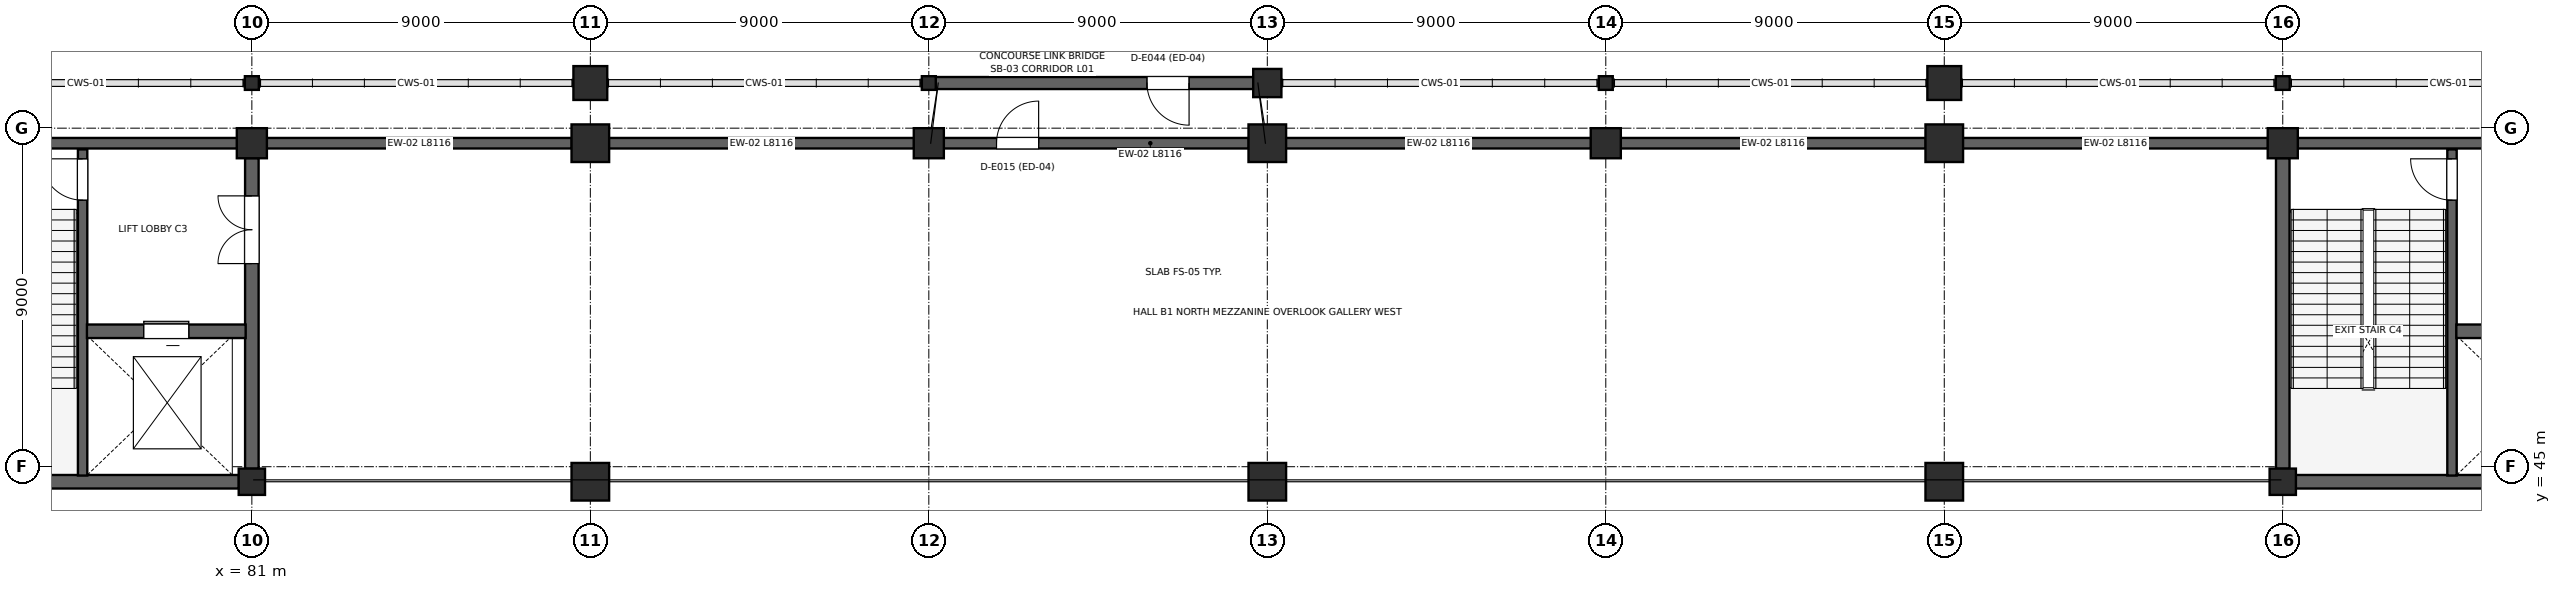
"""IFC4 building model, lengths in metres.
Left out: names, types, materials, properties, quantities, classifications, styles, units other than length and angle.
Written with IfcOpenShell. Run it as: python <this file> out.ifc"""

import sys

from ifc_helpers import new_model, si_unit, direction, frame, frame_2d, origin, origin_2d, place, context, subcontext, project, spatial, rectangle, circle, i_section, extrude, element, fill, save


model = new_model("IFC4")
c1 = context("Model", 3, precision=1e-05, world=origin(), true_north=direction((0.0, 1.0)))
c2 = subcontext(c1, "Body", "Model", "MODEL_VIEW")
j1 = project(units=[si_unit("LENGTHUNIT", "METRE"), si_unit("PLANEANGLEUNIT", "RADIAN")], contexts=[c1])
p1 = place(None, origin())
s1 = spatial("IfcSite", under=j1, at=p1, CompositionType="ELEMENT")
p2 = place(p1, origin())
s2 = spatial("IfcBuilding", under=s1, at=p2, CompositionType="ELEMENT")
p3 = place(p2, frame((0.0, 0.0, 6.0)))
s3 = spatial("IfcBuildingStorey", under=s2, at=p3, CompositionType="ELEMENT", Elevation=6.0)
for number, where, z_axis, x_axis in (
    (1, (90.0, 44.6, 0.0), (0.0, 0.0, 1.0), (1.0, 0.0, 0.0)),
    (2, (90.0, 53.6, 0.0), (0.0, 0.0, 1.0), (1.0, 0.0, 0.0)),
    (3, (108.0, 44.6, 0.0), (0.0, 0.0, 1.0), (1.0, 0.0, 0.0)),
    (4, (108.0, 53.6, 0.0), (0.0, 0.0, 1.0), (1.0, 0.0, 0.0)),
    (5, (126.0, 44.6, 0.0), (0.0, 0.0, 1.0), (1.0, 0.0, 0.0)),
    (6, (126.0, 53.6, 0.0), (0.0, 0.0, 1.0), (1.0, 0.0, 0.0)),
):
    element("IfcColumn", number, at=place(p3, frame(where, z_axis=z_axis, x_axis=x_axis)), inside=s3, PredefinedType="COLUMN", context=c2, shape_type="SweptSolid", body=[
        extrude(rectangle(XDim=1.0, YDim=1.0, at=origin_2d()), origin(), (0.0, 0.0, 1.0), 6.0),
    ])
for number, where, z_axis, x_axis in (
    (7, (81.0, 53.6, 0.0), (0.0, 0.0, 1.0), (1.0, 0.0, 0.0)),
    (8, (99.0, 53.6, 0.0), (0.0, 0.0, 1.0), (1.0, 0.0, 0.0)),
    (9, (117.0, 53.6, 0.0), (0.0, 0.0, 1.0), (1.0, 0.0, 0.0)),
    (10, (135.0, 53.6, 0.0), (0.0, 0.0, 1.0), (1.0, 0.0, 0.0)),
):
    element("IfcColumn", number, at=place(p3, frame(where, z_axis=z_axis, x_axis=x_axis)), inside=s3, PredefinedType="COLUMN", context=c2, shape_type="SweptSolid", body=[
        extrude(rectangle(XDim=0.8, YDim=0.8, at=origin_2d()), origin(), (0.0, 0.0, 1.0), 6.0),
    ])
for number, where, z_axis, x_axis in (
    (11, (81.0, 44.6, 0.0), (0.0, 0.0, 1.0), (1.0, 0.0, 0.0)),
    (12, (135.0, 44.6, 0.0), (0.0, 0.0, 1.0), (1.0, 0.0, 0.0)),
):
    element("IfcColumn", number, at=place(p3, frame(where, z_axis=z_axis, x_axis=x_axis)), inside=s3, PredefinedType="COLUMN", context=c2, shape_type="SweptSolid", body=[
        extrude(rectangle(XDim=0.7, YDim=0.7, at=origin_2d()), origin(), (0.0, 0.0, 1.0), 6.0),
    ])
p4 = place(p3, frame((81.0, 55.2, 0.0), z_axis=(0.0, 0.0, 1.0), x_axis=(1.0, 0.0, 0.0)))
e13 = element("IfcColumn", 13, at=p4, inside=s3, PredefinedType="COLUMN", context=c2, shape_type="SweptSolid", body=[
    extrude(i_section(OverallWidth=0.371, OverallDepth=0.364, WebThickness=0.013, FlangeThickness=0.022, at=origin_2d()), origin(), (0.0, 0.0, 1.0), 6.0),
])
p5 = place(p3, frame((90.0, 55.2, 0.0), z_axis=(0.0, 0.0, 1.0), x_axis=(1.0, 0.0, 0.0)))
e14 = element("IfcColumn", 14, at=p5, inside=s3, PredefinedType="COLUMN", context=c2, shape_type="SweptSolid", body=[
    extrude(circle(Radius=0.45, at=origin_2d()), origin(), (0.0, 0.0, 1.0), 6.0),
])
p6 = place(p3, frame((99.0, 55.2, 0.0), z_axis=(0.0, 0.0, 1.0), x_axis=(1.0, 0.0, 0.0)))
e15 = element("IfcColumn", 15, at=p6, inside=s3, PredefinedType="COLUMN", context=c2, shape_type="SweptSolid", body=[
    extrude(i_section(OverallWidth=0.371, OverallDepth=0.364, WebThickness=0.013, FlangeThickness=0.022, at=origin_2d()), origin(), (0.0, 0.0, 1.0), 6.0),
])
p7 = place(p3, frame((108.0, 55.2, 0.0), z_axis=(0.0, 0.0, 1.0), x_axis=(1.0, 0.0, 0.0)))
e16 = element("IfcColumn", 16, at=p7, inside=s3, PredefinedType="PILASTER", context=c2, shape_type="SweptSolid", body=[
    extrude(circle(Radius=0.375, at=origin_2d()), origin(), (0.0, 0.0, 1.0), 6.0),
])
p8 = place(p3, frame((117.0, 55.2, 0.0), z_axis=(0.0, 0.0, 1.0), x_axis=(1.0, 0.0, 0.0)))
e17 = element("IfcColumn", 17, at=p8, inside=s3, PredefinedType="COLUMN", context=c2, shape_type="SweptSolid", body=[
    extrude(i_section(OverallWidth=0.371, OverallDepth=0.364, WebThickness=0.013, FlangeThickness=0.022, at=origin_2d()), origin(), (0.0, 0.0, 1.0), 6.0),
])
p9 = place(p3, frame((126.0, 55.2, 0.0), z_axis=(0.0, 0.0, 1.0), x_axis=(1.0, 0.0, 0.0)))
e18 = element("IfcColumn", 18, at=p9, inside=s3, PredefinedType="COLUMN", context=c2, shape_type="SweptSolid", body=[
    extrude(circle(Radius=0.45, at=origin_2d()), origin(), (0.0, 0.0, 1.0), 6.0),
])
p10 = place(p3, frame((135.0, 55.2, 0.0), z_axis=(0.0, 0.0, 1.0), x_axis=(1.0, 0.0, 0.0)))
e19 = element("IfcColumn", 19, at=p10, inside=s3, PredefinedType="COLUMN", context=c2, shape_type="SweptSolid", body=[
    extrude(i_section(OverallWidth=0.371, OverallDepth=0.364, WebThickness=0.013, FlangeThickness=0.022, at=origin_2d()), origin(), (0.0, 0.0, 1.0), 6.0),
])
for number, where, z_axis, x_axis in (
    (20, (72.492, 53.6, 0.0), (0.0, 0.0, 1.0), (1.0, 0.0, 0.0)),
    (21, (81.392, 53.6, 0.0), (0.0, 0.0, 1.0), (1.0, 0.0, 0.0)),
    (22, (90.492, 53.6, 0.0), (0.0, 0.0, 1.0), (1.0, 0.0, 0.0)),
):
    element("IfcWall", number, at=place(p3, frame(where, z_axis=z_axis, x_axis=x_axis)), inside=s3, PredefinedType="STANDARD", context=c2, shape_type="SweptSolid", body=[
        extrude(rectangle(XDim=8.116, YDim=0.28, at=frame_2d((4.058, 0.0))), origin(), (0.0, 0.0, 1.0), 5.7),
    ])
p11 = place(p3, frame((99.392, 53.6, 0.0), z_axis=(0.0, 0.0, 1.0), x_axis=(1.0, 0.0, 0.0)))
e23 = element("IfcWall", 23, at=p11, inside=s3, PredefinedType="STANDARD", context=c2, shape_type="SweptSolid", body=[
    extrude(rectangle(XDim=8.116, YDim=0.28, at=frame_2d((4.058, 0.0))), origin(), (0.0, 0.0, 1.0), 5.7),
])
p12 = place(p11, frame((1.408, 0.0, 0.0)))
e24 = element("IfcOpeningElement", 24, at=p12, cuts=e23, PredefinedType="OPENING", context=c2, shape_type="SweptSolid", body=[
    extrude(rectangle(XDim=1.12, YDim=2.24, at=frame_2d((0.56, 1.12))), frame((0.0, 0.15, 0.0), z_axis=(0.0, -1.0, 0.0), x_axis=(1.0, 0.0, 0.0)), (0.0, 0.0, 1.0), 0.3),
])
for number, where, z_axis, x_axis in (
    (25, (108.492, 53.6, 0.0), (0.0, 0.0, 1.0), (1.0, 0.0, 0.0)),
    (26, (117.392, 53.6, 0.0), (0.0, 0.0, 1.0), (1.0, 0.0, 0.0)),
    (27, (126.492, 53.6, 0.0), (0.0, 0.0, 1.0), (1.0, 0.0, 0.0)),
    (28, (135.392, 53.6, 0.0), (0.0, 0.0, 1.0), (1.0, 0.0, 0.0)),
):
    element("IfcWall", number, at=place(p3, frame(where, z_axis=z_axis, x_axis=x_axis)), inside=s3, PredefinedType="STANDARD", context=c2, shape_type="SweptSolid", body=[
        extrude(rectangle(XDim=8.116, YDim=0.28, at=frame_2d((4.058, 0.0))), origin(), (0.0, 0.0, 1.0), 5.7),
    ])
p13 = place(p3, frame((107.64, 55.2, 0.0), z_axis=(0.0, 0.0, 1.0), x_axis=(-1.0, 0.0, 0.0)))
e29 = element("IfcWall", 29, at=p13, inside=s3, PredefinedType="STANDARD", context=c2, shape_type="SweptSolid", body=[
    extrude(rectangle(XDim=8.627, YDim=0.32, at=frame_2d((4.313, 0.0))), origin(), (0.0, 0.0, 1.0), 5.78),
])
p14 = place(p13, frame((1.72, 0.0, 0.0)))
e30 = element("IfcOpeningElement", 30, at=p14, cuts=e29, PredefinedType="OPENING", context=c2, shape_type="SweptSolid", body=[
    extrude(rectangle(XDim=1.12, YDim=2.24, at=frame_2d((0.56, 1.12))), frame((0.0, 0.17, 0.0), z_axis=(0.0, -1.0, 0.0), x_axis=(1.0, 0.0, 0.0)), (0.0, 0.0, 1.0), 0.34),
])
p15 = place(p3, frame((81.0, 44.945, 0.0), z_axis=(0.0, 0.0, 1.0), x_axis=(0.0, 1.0, 0.0)))
e31 = element("IfcWall", 31, at=p15, inside=s3, PredefinedType="SHEAR", context=c2, shape_type="SweptSolid", body=[
    extrude(rectangle(XDim=8.26, YDim=0.36, at=frame_2d((4.13, 0.0))), origin(), (0.0, 0.0, 1.0), 5.7),
])
p16 = place(p15, frame((5.455, 0.0, 0.0)))
e32 = element("IfcOpeningElement", 32, at=p16, cuts=e31, PredefinedType="OPENING", context=c2, shape_type="SweptSolid", body=[
    extrude(rectangle(XDim=1.8, YDim=2.3, at=frame_2d((0.9, 1.15))), frame((0.0, 0.19, 0.0), z_axis=(0.0, -1.0, 0.0), x_axis=(1.0, 0.0, 0.0)), (0.0, 0.0, 1.0), 0.38),
])
p17 = place(p3, frame((72.495, 44.6, 0.0), z_axis=(0.0, 0.0, 1.0), x_axis=(1.0, 0.0, 0.0)))
e33 = element("IfcWall", 33, at=p17, inside=s3, PredefinedType="SHEAR", context=c2, shape_type="SweptSolid", body=[
    extrude(rectangle(XDim=8.16, YDim=0.36, at=frame_2d((4.08, 0.0))), origin(), (0.0, 0.0, 1.0), 5.7),
])
p18 = place(p3, frame((76.5, 44.765, 0.0), z_axis=(0.0, 0.0, 1.0), x_axis=(0.0, 1.0, 0.0)))
e34 = element("IfcWall", 34, at=p18, inside=s3, PredefinedType="SHEAR", context=c2, shape_type="SweptSolid", body=[
    extrude(rectangle(XDim=8.67, YDim=0.25, at=frame_2d((4.335, 0.0))), origin(), (0.0, 0.0, 1.0), 5.7),
])
p19 = place(p18, frame((7.32, 0.0, 0.0)))
e35 = element("IfcOpeningElement", 35, at=p19, cuts=e34, PredefinedType="OPENING", context=c2, shape_type="SweptSolid", body=[
    extrude(rectangle(XDim=1.1, YDim=2.2, at=frame_2d((0.55, 1.1))), frame((0.0, 0.135, 0.0), z_axis=(0.0, -1.0, 0.0), x_axis=(1.0, 0.0, 0.0)), (0.0, 0.0, 1.0), 0.27),
])
p20 = place(p3, frame((76.615, 48.6, 0.0), z_axis=(0.0, 0.0, 1.0), x_axis=(1.0, 0.0, 0.0)))
e36 = element("IfcWall", 36, at=p20, inside=s3, PredefinedType="SHEAR", context=c2, shape_type="SweptSolid", body=[
    extrude(rectangle(XDim=4.22, YDim=0.36, at=frame_2d((2.11, 0.0))), origin(), (0.0, 0.0, 1.0), 5.7),
])
p21 = place(p20, frame((1.51, 0.0, 0.0)))
e37 = element("IfcOpeningElement", 37, at=p21, cuts=e36, PredefinedType="OPENING", context=c2, shape_type="SweptSolid", body=[
    extrude(rectangle(XDim=1.2, YDim=2.3, at=frame_2d((0.6, 1.15))), frame((0.0, 0.19, 0.0), z_axis=(0.0, -1.0, 0.0), x_axis=(1.0, 0.0, 0.0)), (0.0, 0.0, 1.0), 0.38),
])
p22 = place(p3, frame((135.0, 44.945, 0.0), z_axis=(0.0, 0.0, 1.0), x_axis=(0.0, 1.0, 0.0)))
e38 = element("IfcWall", 38, at=p22, inside=s3, PredefinedType="SHEAR", context=c2, shape_type="SweptSolid", body=[
    extrude(rectangle(XDim=8.26, YDim=0.36, at=frame_2d((4.13, 0.0))), origin(), (0.0, 0.0, 1.0), 5.7),
])
p23 = place(p3, frame((135.345, 44.6, 0.0), z_axis=(0.0, 0.0, 1.0), x_axis=(1.0, 0.0, 0.0)))
e39 = element("IfcWall", 39, at=p23, inside=s3, PredefinedType="SHEAR", context=c2, shape_type="SweptSolid", body=[
    extrude(rectangle(XDim=8.16, YDim=0.36, at=frame_2d((4.08, 0.0))), origin(), (0.0, 0.0, 1.0), 5.7),
])
p24 = place(p3, frame((139.5, 44.765, 0.0), z_axis=(0.0, 0.0, 1.0), x_axis=(0.0, 1.0, 0.0)))
e40 = element("IfcWall", 40, at=p24, inside=s3, PredefinedType="SHEAR", context=c2, shape_type="SweptSolid", body=[
    extrude(rectangle(XDim=8.67, YDim=0.25, at=frame_2d((4.335, 0.0))), origin(), (0.0, 0.0, 1.0), 5.7),
])
p25 = place(p24, frame((7.32, 0.0, 0.0)))
e41 = element("IfcOpeningElement", 41, at=p25, cuts=e40, PredefinedType="OPENING", context=c2, shape_type="SweptSolid", body=[
    extrude(rectangle(XDim=1.1, YDim=2.2, at=frame_2d((0.55, 1.1))), frame((0.0, 0.135, 0.0), z_axis=(0.0, -1.0, 0.0), x_axis=(1.0, 0.0, 0.0)), (0.0, 0.0, 1.0), 0.27),
])
p26 = place(p3, frame((139.615, 48.6, 0.0), z_axis=(0.0, 0.0, 1.0), x_axis=(1.0, 0.0, 0.0)))
e42 = element("IfcWall", 42, at=p26, inside=s3, PredefinedType="SHEAR", context=c2, shape_type="SweptSolid", body=[
    extrude(rectangle(XDim=4.22, YDim=0.36, at=frame_2d((2.11, 0.0))), origin(), (0.0, 0.0, 1.0), 5.7),
])
p27 = place(p26, frame((1.51, 0.0, 0.0)))
e43 = element("IfcOpeningElement", 43, at=p27, cuts=e42, PredefinedType="OPENING", context=c2, shape_type="SweptSolid", body=[
    extrude(rectangle(XDim=1.2, YDim=2.3, at=frame_2d((0.6, 1.15))), frame((0.0, 0.19, 0.0), z_axis=(0.0, -1.0, 0.0), x_axis=(1.0, 0.0, 0.0)), (0.0, 0.0, 1.0), 0.38),
])
p28 = place(p12, origin())
e44 = element("IfcDoor", 44, at=p28, inside=s3, OperationType="SINGLE_SWING_RIGHT", PredefinedType="DOOR", context=c2, shape_type="SweptSolid", body=[
    extrude(rectangle(XDim=1.12, YDim=2.24, at=frame_2d((0.56, 1.12))), frame((0.0, 0.025, 0.0), z_axis=(0.0, -1.0, 0.0), x_axis=(1.0, 0.0, 0.0)), (0.0, 0.0, 1.0), 0.05),
])
fill(e24, e44)
p29 = place(p14, origin())
e45 = element("IfcDoor", 45, at=p29, inside=s3, OperationType="SINGLE_SWING_LEFT", PredefinedType="DOOR", context=c2, shape_type="SweptSolid", body=[
    extrude(rectangle(XDim=1.12, YDim=2.24, at=frame_2d((0.56, 1.12))), frame((0.0, 0.025, 0.0), z_axis=(0.0, -1.0, 0.0), x_axis=(1.0, 0.0, 0.0)), (0.0, 0.0, 1.0), 0.05),
])
fill(e30, e45)
p30 = place(p19, origin())
e46 = element("IfcDoor", 46, at=p30, inside=s3, OperationType="SINGLE_SWING_RIGHT", PredefinedType="DOOR", context=c2, shape_type="SweptSolid", body=[
    extrude(rectangle(XDim=1.1, YDim=2.2, at=frame_2d((0.55, 1.1))), frame((0.0, 0.025, 0.0), z_axis=(0.0, -1.0, 0.0), x_axis=(1.0, 0.0, 0.0)), (0.0, 0.0, 1.0), 0.05),
])
fill(e35, e46)
p31 = place(p21, origin())
e47 = element("IfcDoor", 47, at=p31, inside=s3, OperationType="SLIDING_TO_RIGHT", PredefinedType="DOOR", context=c2, shape_type="SweptSolid", body=[
    extrude(rectangle(XDim=1.2, YDim=2.3, at=frame_2d((0.6, 1.15))), frame((0.0, 0.025, 0.0), z_axis=(0.0, -1.0, 0.0), x_axis=(1.0, 0.0, 0.0)), (0.0, 0.0, 1.0), 0.05),
])
fill(e37, e47)
p32 = place(p16, origin())
e48 = element("IfcDoor", 48, at=p32, inside=s3, OperationType="DOUBLE_DOOR_SINGLE_SWING", PredefinedType="DOOR", context=c2, shape_type="SweptSolid", body=[
    extrude(rectangle(XDim=1.8, YDim=2.3, at=frame_2d((0.9, 1.15))), frame((0.0, 0.025, 0.0), z_axis=(0.0, -1.0, 0.0), x_axis=(1.0, 0.0, 0.0)), (0.0, 0.0, 1.0), 0.05),
])
fill(e32, e48)
p33 = place(p25, origin())
e49 = element("IfcDoor", 49, at=p33, inside=s3, OperationType="SINGLE_SWING_RIGHT", PredefinedType="DOOR", context=c2, shape_type="SweptSolid", body=[
    extrude(rectangle(XDim=1.1, YDim=2.2, at=frame_2d((0.55, 1.1))), frame((0.0, 0.025, 0.0), z_axis=(0.0, -1.0, 0.0), x_axis=(1.0, 0.0, 0.0)), (0.0, 0.0, 1.0), 0.05),
])
fill(e41, e49)
save(model, sys.argv[1])
